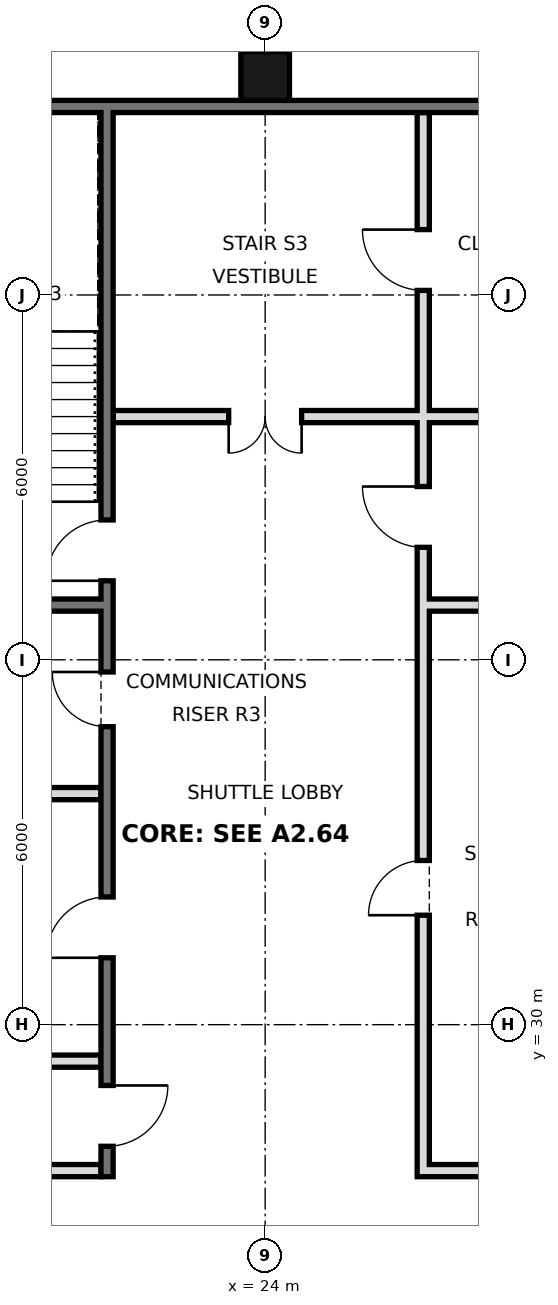
"""IFC4 building model, lengths in metres.
Left out: names, types, materials, properties, quantities, classifications, styles, units other than length and angle.
Written with IfcOpenShell. Run it as: python <this file> out.ifc"""

import sys

from ifc_helpers import new_model, si_unit, direction, frame, frame_2d, origin, origin_2d, place, context, subcontext, project, spatial, rectangle, hollow_rectangle, extrude, element, fill, save


model = new_model("IFC4")
c1 = context("Model", 3, precision=1e-05, world=origin(), true_north=direction((0.0, 1.0)))
c2 = subcontext(c1, "Body", "Model", "MODEL_VIEW")
j1 = project(units=[si_unit("LENGTHUNIT", "METRE"), si_unit("PLANEANGLEUNIT", "RADIAN")], contexts=[c1])
p1 = place(None, origin())
s1 = spatial("IfcSite", under=j1, at=p1, CompositionType="ELEMENT")
p2 = place(p1, origin())
s2 = spatial("IfcBuilding", under=s1, at=p2, CompositionType="ELEMENT")
p3 = place(p2, frame((0.0, 0.0, 254.0)))
s3 = spatial("IfcBuildingStorey", under=s2, at=p3, CompositionType="ELEMENT", Elevation=254.0)
p4 = place(p3, frame((24.0, 45.6, 0.0), z_axis=(0.0, 0.0, 1.0), x_axis=(1.0, 0.0, 0.0)))
e1 = element("IfcColumn", 1, at=p4, inside=s3, PredefinedType="COLUMN", context=c2, shape_type="SweptSolid", body=[
    extrude(hollow_rectangle(XDim=0.8, YDim=0.8, WallThickness=0.032, at=origin_2d()), origin(), (0.0, 0.0, 1.0), 3.6),
])
p5 = place(p3, frame((6.6, 45.1, 0.0), z_axis=(0.0, 0.0, 1.0), x_axis=(1.0, 0.0, 0.0)))
e2 = element("IfcWall", 2, at=p5, inside=s3, PredefinedType="SOLIDWALL", context=c2, shape_type="SweptSolid", body=[
    extrude(rectangle(XDim=34.8, YDim=0.2, at=frame_2d((17.4, 0.0))), origin(), (0.0, 0.0, 1.0), 3.38),
])
p6 = place(p3, frame((21.4, 27.5, 0.0), z_axis=(0.0, 0.0, 1.0), x_axis=(0.0, 1.0, 0.0)))
e3 = element("IfcWall", 3, at=p6, inside=s3, PredefinedType="SOLIDWALL", context=c2, shape_type="SweptSolid", body=[
    extrude(rectangle(XDim=17.5, YDim=0.2, at=frame_2d((8.75, 0.0))), origin(), (0.0, 0.0, 1.0), 3.38),
])
p7 = place(p6, frame((0.5, 0.0, 0.0)))
e4 = element("IfcOpeningElement", 4, at=p7, cuts=e3, PredefinedType="OPENING", context=c2, shape_type="SweptSolid", body=[
    extrude(rectangle(XDim=1.0, YDim=2.1, at=frame_2d((0.5, 1.05))), frame((0.0, 0.11, 0.0), z_axis=(0.0, -1.0, 0.0), x_axis=(1.0, 0.0, 0.0)), (0.0, 0.0, 1.0), 0.22),
])
p8 = place(p6, frame((3.6, 0.0, 0.0)))
e5 = element("IfcOpeningElement", 5, at=p8, cuts=e3, PredefinedType="OPENING", context=c2, shape_type="SweptSolid", body=[
    extrude(rectangle(XDim=1.0, YDim=2.1, at=frame_2d((0.5, 1.05))), frame((0.0, 0.11, 0.0), z_axis=(0.0, -1.0, 0.0), x_axis=(1.0, 0.0, 0.0)), (0.0, 0.0, 1.0), 0.22),
])
p9 = place(p6, frame((9.8, 0.0, 0.0)))
e6 = element("IfcOpeningElement", 6, at=p9, cuts=e3, PredefinedType="OPENING", context=c2, shape_type="SweptSolid", body=[
    extrude(rectangle(XDim=1.0, YDim=2.1, at=frame_2d((0.5, 1.05))), frame((0.0, 0.11, 0.0), z_axis=(0.0, -1.0, 0.0), x_axis=(1.0, 0.0, 0.0)), (0.0, 0.0, 1.0), 0.22),
])
p10 = place(p6, frame((7.4, 0.0, 0.0)))
e7 = element("IfcOpeningElement", 7, at=p10, cuts=e3, PredefinedType="OPENING", context=c2, shape_type="SweptSolid", body=[
    extrude(rectangle(XDim=0.9, YDim=2.1, at=frame_2d((0.45, 1.05))), frame((0.0, 0.11, 0.0), z_axis=(0.0, -1.0, 0.0), x_axis=(1.0, 0.0, 0.0)), (0.0, 0.0, 1.0), 0.22),
])
p11 = place(p3, frame((26.6, 27.5, 0.0), z_axis=(0.0, 0.0, 1.0), x_axis=(0.0, 1.0, 0.0)))
e8 = element("IfcWall", 8, at=p11, inside=s3, PredefinedType="SOLIDWALL", context=c2, shape_type="SweptSolid", body=[
    extrude(rectangle(XDim=17.5, YDim=0.2, at=frame_2d((8.75, 0.0))), origin(), (0.0, 0.0, 1.0), 3.38),
])
p12 = place(p11, frame((4.3, 0.0, 0.0)))
e9 = element("IfcOpeningElement", 9, at=p12, cuts=e8, PredefinedType="OPENING", context=c2, shape_type="SweptSolid", body=[
    extrude(rectangle(XDim=0.9, YDim=2.1, at=frame_2d((0.45, 1.05))), frame((0.0, 0.11, 0.0), z_axis=(0.0, -1.0, 0.0), x_axis=(1.0, 0.0, 0.0)), (0.0, 0.0, 1.0), 0.22),
])
p13 = place(p11, frame((10.35, 0.0, 0.0)))
e10 = element("IfcOpeningElement", 10, at=p13, cuts=e8, PredefinedType="OPENING", context=c2, shape_type="SweptSolid", body=[
    extrude(rectangle(XDim=1.0, YDim=2.1, at=frame_2d((0.5, 1.05))), frame((0.0, 0.11, 0.0), z_axis=(0.0, -1.0, 0.0), x_axis=(1.0, 0.0, 0.0)), (0.0, 0.0, 1.0), 0.22),
])
p14 = place(p11, frame((14.575, 0.0, 0.0)))
e11 = element("IfcOpeningElement", 11, at=p14, cuts=e8, PredefinedType="OPENING", context=c2, shape_type="SweptSolid", body=[
    extrude(rectangle(XDim=1.0, YDim=2.1, at=frame_2d((0.5, 1.05))), frame((0.0, 0.11, 0.0), z_axis=(0.0, -1.0, 0.0), x_axis=(1.0, 0.0, 0.0)), (0.0, 0.0, 1.0), 0.22),
])
p15 = place(p3, frame((18.6, 27.6, 0.0), z_axis=(0.0, 0.0, 1.0), x_axis=(1.0, 0.0, 0.0)))
e12 = element("IfcWall", 12, at=p15, inside=s3, PredefinedType="PARTITIONING", context=c2, shape_type="SweptSolid", body=[
    extrude(rectangle(XDim=2.7, YDim=0.2, at=frame_2d((1.35, 0.0))), origin(), (0.0, 0.0, 1.0), 3.38),
])
p16 = place(p3, frame((26.7, 27.6, 0.0), z_axis=(0.0, 0.0, 1.0), x_axis=(1.0, 0.0, 0.0)))
e13 = element("IfcWall", 13, at=p16, inside=s3, PredefinedType="SOLIDWALL", context=c2, shape_type="SweptSolid", body=[
    extrude(rectangle(XDim=2.7, YDim=0.2, at=frame_2d((1.35, 0.0))), origin(), (0.0, 0.0, 1.0), 3.38),
])
p17 = place(p3, frame((18.6, 29.4, 0.0), z_axis=(0.0, 0.0, 1.0), x_axis=(1.0, 0.0, 0.0)))
e14 = element("IfcWall", 14, at=p17, inside=s3, PredefinedType="PARTITIONING", context=c2, shape_type="SweptSolid", body=[
    extrude(rectangle(XDim=2.7, YDim=0.2, at=frame_2d((1.35, 0.0))), origin(), (0.0, 0.0, 1.0), 3.38),
])
for number, where, z_axis, x_axis in (
    (15, (18.6, 33.8, 0.0), (0.0, 0.0, 1.0), (1.0, 0.0, 0.0)),
    (16, (18.6, 36.9, 0.0), (0.0, 0.0, 1.0), (1.0, 0.0, 0.0)),
    (17, (26.7, 36.9, 0.0), (0.0, 0.0, 1.0), (1.0, 0.0, 0.0)),
):
    element("IfcWall", number, at=place(p3, frame(where, z_axis=z_axis, x_axis=x_axis)), inside=s3, PredefinedType="SOLIDWALL", context=c2, shape_type="SweptSolid", body=[
        extrude(rectangle(XDim=2.7, YDim=0.2, at=frame_2d((1.35, 0.0))), origin(), (0.0, 0.0, 1.0), 3.38),
    ])
p18 = place(p3, frame((21.5, 40.0, 0.0), z_axis=(0.0, 0.0, 1.0), x_axis=(1.0, 0.0, 0.0)))
e18 = element("IfcWall", 18, at=p18, inside=s3, PredefinedType="PARTITIONING", context=c2, shape_type="SweptSolid", body=[
    extrude(rectangle(XDim=7.9, YDim=0.2, at=frame_2d((3.95, 0.0))), origin(), (0.0, 0.0, 1.0), 3.38),
])
p19 = place(p18, frame((1.9, 0.0, 0.0)))
e19 = element("IfcOpeningElement", 19, at=p19, cuts=e18, PredefinedType="OPENING", context=c2, shape_type="SweptSolid", body=[
    extrude(rectangle(XDim=1.2, YDim=2.1, at=frame_2d((0.6, 1.05))), frame((0.0, 0.11, 0.0), z_axis=(0.0, -1.0, 0.0), x_axis=(1.0, 0.0, 0.0)), (0.0, 0.0, 1.0), 0.22),
])
p20 = place(p19, frame((1.2, 0.0, 0.0), z_axis=(0.0, 0.0, 1.0), x_axis=(-1.0, 0.0, 0.0)))
e20 = element("IfcDoor", 20, at=p20, inside=s3, OperationType="DOUBLE_DOOR_SINGLE_SWING", PredefinedType="DOOR", context=c2, shape_type="SweptSolid", body=[
    extrude(rectangle(XDim=1.2, YDim=2.1, at=frame_2d((0.6, 1.05))), frame((0.0, 0.025, 0.0), z_axis=(0.0, -1.0, 0.0), x_axis=(1.0, 0.0, 0.0)), (0.0, 0.0, 1.0), 0.05),
])
fill(e19, e20)
p21 = place(p7, origin())
e21 = element("IfcDoor", 21, at=p21, inside=s3, OperationType="SINGLE_SWING_RIGHT", PredefinedType="DOOR", context=c2, shape_type="SweptSolid", body=[
    extrude(rectangle(XDim=1.0, YDim=2.1, at=frame_2d((0.5, 1.05))), frame((0.0, 0.025, 0.0), z_axis=(0.0, -1.0, 0.0), x_axis=(1.0, 0.0, 0.0)), (0.0, 0.0, 1.0), 0.05),
])
fill(e4, e21)
p22 = place(p8, origin())
e22 = element("IfcDoor", 22, at=p22, inside=s3, OperationType="SINGLE_SWING_LEFT", PredefinedType="DOOR", context=c2, shape_type="SweptSolid", body=[
    extrude(rectangle(XDim=1.0, YDim=2.1, at=frame_2d((0.5, 1.05))), frame((0.0, 0.025, 0.0), z_axis=(0.0, -1.0, 0.0), x_axis=(1.0, 0.0, 0.0)), (0.0, 0.0, 1.0), 0.05),
])
fill(e5, e22)
p23 = place(p9, origin())
e23 = element("IfcDoor", 23, at=p23, inside=s3, OperationType="SINGLE_SWING_LEFT", PredefinedType="DOOR", context=c2, shape_type="SweptSolid", body=[
    extrude(rectangle(XDim=1.0, YDim=2.1, at=frame_2d((0.5, 1.05))), frame((0.0, 0.025, 0.0), z_axis=(0.0, -1.0, 0.0), x_axis=(1.0, 0.0, 0.0)), (0.0, 0.0, 1.0), 0.05),
])
fill(e6, e23)
p24 = place(p10, frame((0.9, 0.0, 0.0), z_axis=(0.0, 0.0, 1.0), x_axis=(-1.0, 0.0, 0.0)))
e24 = element("IfcDoor", 24, at=p24, inside=s3, OperationType="SINGLE_SWING_LEFT", PredefinedType="DOOR", context=c2, shape_type="SweptSolid", body=[
    extrude(rectangle(XDim=0.9, YDim=2.1, at=frame_2d((0.45, 1.05))), frame((0.0, 0.025, 0.0), z_axis=(0.0, -1.0, 0.0), x_axis=(1.0, 0.0, 0.0)), (0.0, 0.0, 1.0), 0.05),
])
fill(e7, e24)
p25 = place(p12, origin())
e25 = element("IfcDoor", 25, at=p25, inside=s3, OperationType="SINGLE_SWING_LEFT", PredefinedType="DOOR", context=c2, shape_type="SweptSolid", body=[
    extrude(rectangle(XDim=0.9, YDim=2.1, at=frame_2d((0.45, 1.05))), frame((0.0, 0.025, 0.0), z_axis=(0.0, -1.0, 0.0), x_axis=(1.0, 0.0, 0.0)), (0.0, 0.0, 1.0), 0.05),
])
fill(e9, e25)
p26 = place(p13, frame((1.0, 0.0, 0.0), z_axis=(0.0, 0.0, 1.0), x_axis=(-1.0, 0.0, 0.0)))
e26 = element("IfcDoor", 26, at=p26, inside=s3, OperationType="SINGLE_SWING_LEFT", PredefinedType="DOOR", context=c2, shape_type="SweptSolid", body=[
    extrude(rectangle(XDim=1.0, YDim=2.1, at=frame_2d((0.5, 1.05))), frame((0.0, 0.025, 0.0), z_axis=(0.0, -1.0, 0.0), x_axis=(1.0, 0.0, 0.0)), (0.0, 0.0, 1.0), 0.05),
])
fill(e10, e26)
p27 = place(p14, frame((1.0, 0.0, 0.0), z_axis=(0.0, 0.0, 1.0), x_axis=(-1.0, 0.0, 0.0)))
e27 = element("IfcDoor", 27, at=p27, inside=s3, OperationType="SINGLE_SWING_LEFT", PredefinedType="DOOR", context=c2, shape_type="SweptSolid", body=[
    extrude(rectangle(XDim=1.0, YDim=2.1, at=frame_2d((0.5, 1.05))), frame((0.0, 0.025, 0.0), z_axis=(0.0, -1.0, 0.0), x_axis=(1.0, 0.0, 0.0)), (0.0, 0.0, 1.0), 0.05),
])
fill(e11, e27)
save(model, sys.argv[1])
